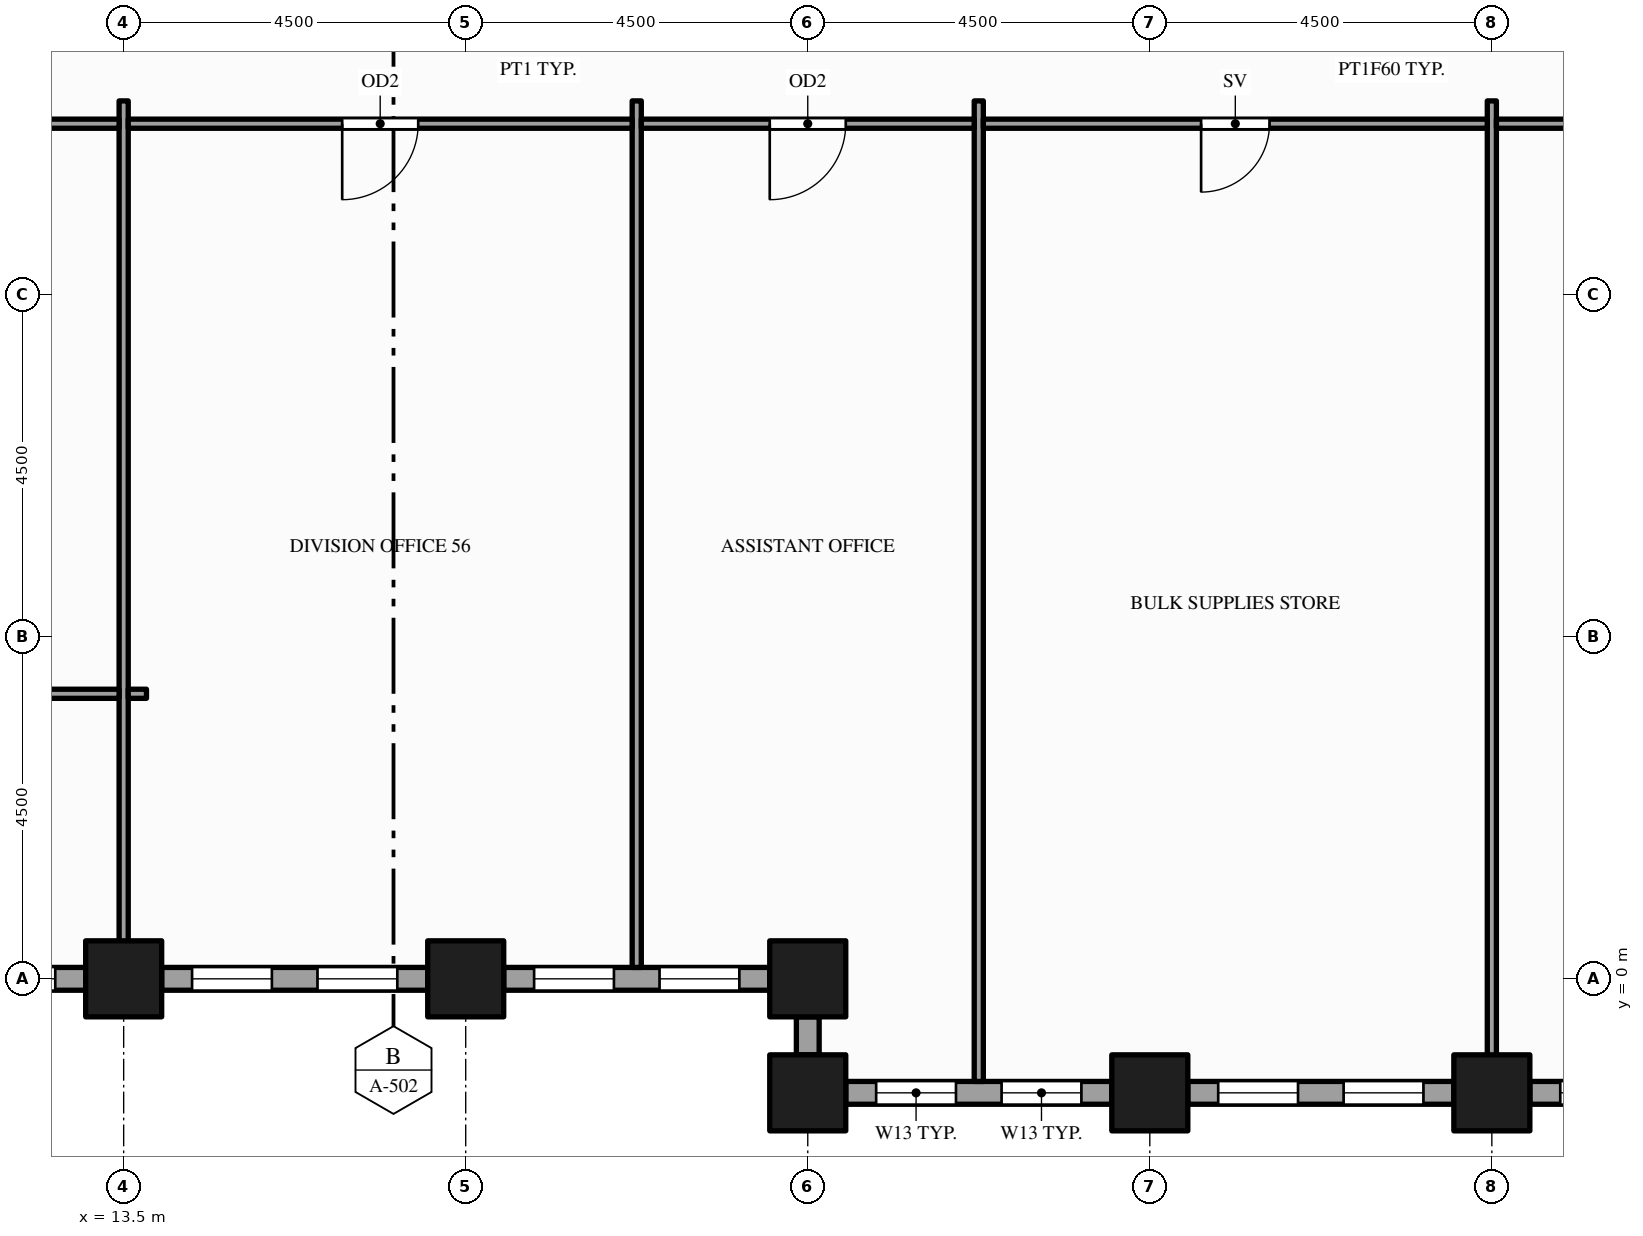
"""IFC4 building model, lengths in metres.
Left out: names, types, materials, properties, quantities, classifications, styles, units other than length and angle.
Written with IfcOpenShell. Run it as: python <this file> out.ifc"""

import sys

from ifc_helpers import new_model, si_unit, direction, frame, frame_2d, origin, origin_2d, place, context, subcontext, project, spatial, rectangle, hollow_rectangle, extrude, element, fill, save


model = new_model("IFC4")
c1 = context("Model", 3, precision=1e-05, world=origin(), true_north=direction((0.0, 1.0)))
c2 = subcontext(c1, "Body", "Model", "MODEL_VIEW")
j1 = project(units=[si_unit("LENGTHUNIT", "METRE"), si_unit("PLANEANGLEUNIT", "RADIAN")], contexts=[c1])
p1 = place(None, origin())
s1 = spatial("IfcSite", under=j1, at=p1, CompositionType="ELEMENT")
p2 = place(p1, origin())
s2 = spatial("IfcBuilding", under=s1, at=p2, CompositionType="ELEMENT")
p3 = place(p2, frame((0.0, 0.0, 123.0)))
s3 = spatial("IfcBuildingStorey", under=s2, at=p3, CompositionType="ELEMENT", Elevation=123.0)
for number, where, z_axis, x_axis in (
    (1, (13.5, 0.0, -0.15), (0.0, 0.0, 1.0), (1.0, 0.0, 0.0)),
    (2, (18.0, 0.0, -0.15), (0.0, 0.0, 1.0), (1.0, 0.0, 0.0)),
    (3, (22.5, -1.5, -0.15), (0.0, 0.0, 1.0), (1.0, 0.0, 0.0)),
    (4, (22.5, 0.0, -0.15), (0.0, 0.0, 1.0), (1.0, 0.0, 0.0)),
    (5, (27.0, -1.5, -0.15), (0.0, 0.0, 1.0), (1.0, 0.0, 0.0)),
    (6, (31.5, -1.5, -0.15), (0.0, 0.0, 1.0), (1.0, 0.0, 0.0)),
):
    element("IfcColumn", number, at=place(p3, frame(where, z_axis=z_axis, x_axis=x_axis)), inside=s3, PredefinedType="COLUMN", context=c2, shape_type="SweptSolid", body=[
        extrude(hollow_rectangle(XDim=1.0, YDim=1.0, WallThickness=0.05, at=origin_2d()), origin(), (0.0, 0.0, 1.0), 4.0),
    ])
p4 = place(p3, frame((23.0, -1.5, 0.0), z_axis=(0.0, 0.0, 1.0), x_axis=(1.0, 0.0, 0.0)))
e7 = element("IfcWall", 7, at=p4, inside=s3, PredefinedType="STANDARD", context=c2, shape_type="SweptSolid", body=[
    extrude(rectangle(XDim=3.5, YDim=0.3, at=frame_2d((1.75, 0.0))), origin(), (0.0, 0.0, 1.0), 3.154),
])
p5 = place(p4, frame((0.4, 0.0, 0.9)))
e8 = element("IfcOpeningElement", 8, at=p5, cuts=e7, PredefinedType="OPENING", context=c2, shape_type="SweptSolid", body=[
    extrude(rectangle(XDim=1.05, YDim=2.0, at=frame_2d((0.525, 1.0))), frame((0.0, 0.16, 0.0), z_axis=(0.0, -1.0, 0.0), x_axis=(1.0, 0.0, 0.0)), (0.0, 0.0, 1.0), 0.32),
])
p6 = place(p4, frame((2.05, 0.0, 0.9)))
e9 = element("IfcOpeningElement", 9, at=p6, cuts=e7, PredefinedType="OPENING", context=c2, shape_type="SweptSolid", body=[
    extrude(rectangle(XDim=1.05, YDim=2.0, at=frame_2d((0.525, 1.0))), frame((0.0, 0.16, 0.0), z_axis=(0.0, -1.0, 0.0), x_axis=(1.0, 0.0, 0.0)), (0.0, 0.0, 1.0), 0.32),
])
p7 = place(p3, frame((27.5, -1.5, 0.0), z_axis=(0.0, 0.0, 1.0), x_axis=(1.0, 0.0, 0.0)))
e10 = element("IfcWall", 10, at=p7, inside=s3, PredefinedType="STANDARD", context=c2, shape_type="SweptSolid", body=[
    extrude(rectangle(XDim=3.5, YDim=0.3, at=frame_2d((1.75, 0.0))), origin(), (0.0, 0.0, 1.0), 3.154),
])
p8 = place(p7, frame((0.4, 0.0, 0.9)))
e11 = element("IfcOpeningElement", 11, at=p8, cuts=e10, PredefinedType="OPENING", context=c2, shape_type="SweptSolid", body=[
    extrude(rectangle(XDim=1.05, YDim=2.0, at=frame_2d((0.525, 1.0))), frame((0.0, 0.16, 0.0), z_axis=(0.0, -1.0, 0.0), x_axis=(1.0, 0.0, 0.0)), (0.0, 0.0, 1.0), 0.32),
])
p9 = place(p7, frame((2.05, 0.0, 0.9)))
e12 = element("IfcOpeningElement", 12, at=p9, cuts=e10, PredefinedType="OPENING", context=c2, shape_type="SweptSolid", body=[
    extrude(rectangle(XDim=1.05, YDim=2.0, at=frame_2d((0.525, 1.0))), frame((0.0, 0.16, 0.0), z_axis=(0.0, -1.0, 0.0), x_axis=(1.0, 0.0, 0.0)), (0.0, 0.0, 1.0), 0.32),
])
p10 = place(p3, frame((32.0, -1.5, 0.0), z_axis=(0.0, 0.0, 1.0), x_axis=(1.0, 0.0, 0.0)))
e13 = element("IfcWall", 13, at=p10, inside=s3, PredefinedType="STANDARD", context=c2, shape_type="SweptSolid", body=[
    extrude(rectangle(XDim=3.5, YDim=0.3, at=frame_2d((1.75, 0.0))), origin(), (0.0, 0.0, 1.0), 3.154),
])
p11 = place(p10, frame((0.4, 0.0, 0.9)))
e14 = element("IfcOpeningElement", 14, at=p11, cuts=e13, PredefinedType="OPENING", context=c2, shape_type="SweptSolid", body=[
    extrude(rectangle(XDim=1.05, YDim=2.0, at=frame_2d((0.525, 1.0))), frame((0.0, 0.16, 0.0), z_axis=(0.0, -1.0, 0.0), x_axis=(1.0, 0.0, 0.0)), (0.0, 0.0, 1.0), 0.32),
])
p12 = place(p10, frame((2.05, 0.0, 0.9)))
e15 = element("IfcOpeningElement", 15, at=p12, cuts=e13, PredefinedType="OPENING", context=c2, shape_type="SweptSolid", body=[
    extrude(rectangle(XDim=1.05, YDim=2.0, at=frame_2d((0.525, 1.0))), frame((0.0, 0.16, 0.0), z_axis=(0.0, -1.0, 0.0), x_axis=(1.0, 0.0, 0.0)), (0.0, 0.0, 1.0), 0.32),
])
p13 = place(p3, frame((9.5, 0.0, 0.0), z_axis=(0.0, 0.0, 1.0), x_axis=(1.0, 0.0, 0.0)))
e16 = element("IfcWall", 16, at=p13, inside=s3, PredefinedType="STANDARD", context=c2, shape_type="SweptSolid", body=[
    extrude(rectangle(XDim=3.5, YDim=0.3, at=frame_2d((1.75, 0.0))), origin(), (0.0, 0.0, 1.0), 3.154),
])
p14 = place(p13, frame((0.4, 0.0, 0.9)))
e17 = element("IfcOpeningElement", 17, at=p14, cuts=e16, PredefinedType="OPENING", context=c2, shape_type="SweptSolid", body=[
    extrude(rectangle(XDim=1.05, YDim=2.0, at=frame_2d((0.525, 1.0))), frame((0.0, 0.16, 0.0), z_axis=(0.0, -1.0, 0.0), x_axis=(1.0, 0.0, 0.0)), (0.0, 0.0, 1.0), 0.32),
])
p15 = place(p13, frame((2.05, 0.0, 0.9)))
e18 = element("IfcOpeningElement", 18, at=p15, cuts=e16, PredefinedType="OPENING", context=c2, shape_type="SweptSolid", body=[
    extrude(rectangle(XDim=1.05, YDim=2.0, at=frame_2d((0.525, 1.0))), frame((0.0, 0.16, 0.0), z_axis=(0.0, -1.0, 0.0), x_axis=(1.0, 0.0, 0.0)), (0.0, 0.0, 1.0), 0.32),
])
p16 = place(p3, frame((14.0, 0.0, 0.0), z_axis=(0.0, 0.0, 1.0), x_axis=(1.0, 0.0, 0.0)))
e19 = element("IfcWall", 19, at=p16, inside=s3, PredefinedType="STANDARD", context=c2, shape_type="SweptSolid", body=[
    extrude(rectangle(XDim=3.5, YDim=0.3, at=frame_2d((1.75, 0.0))), origin(), (0.0, 0.0, 1.0), 3.154),
])
p17 = place(p16, frame((0.4, 0.0, 0.9)))
e20 = element("IfcOpeningElement", 20, at=p17, cuts=e19, PredefinedType="OPENING", context=c2, shape_type="SweptSolid", body=[
    extrude(rectangle(XDim=1.05, YDim=2.0, at=frame_2d((0.525, 1.0))), frame((0.0, 0.16, 0.0), z_axis=(0.0, -1.0, 0.0), x_axis=(1.0, 0.0, 0.0)), (0.0, 0.0, 1.0), 0.32),
])
p18 = place(p16, frame((2.05, 0.0, 0.9)))
e21 = element("IfcOpeningElement", 21, at=p18, cuts=e19, PredefinedType="OPENING", context=c2, shape_type="SweptSolid", body=[
    extrude(rectangle(XDim=1.05, YDim=2.0, at=frame_2d((0.525, 1.0))), frame((0.0, 0.16, 0.0), z_axis=(0.0, -1.0, 0.0), x_axis=(1.0, 0.0, 0.0)), (0.0, 0.0, 1.0), 0.32),
])
p19 = place(p3, frame((18.5, 0.0, 0.0), z_axis=(0.0, 0.0, 1.0), x_axis=(1.0, 0.0, 0.0)))
e22 = element("IfcWall", 22, at=p19, inside=s3, PredefinedType="STANDARD", context=c2, shape_type="SweptSolid", body=[
    extrude(rectangle(XDim=3.5, YDim=0.3, at=frame_2d((1.75, 0.0))), origin(), (0.0, 0.0, 1.0), 3.154),
])
p20 = place(p19, frame((0.4, 0.0, 0.9)))
e23 = element("IfcOpeningElement", 23, at=p20, cuts=e22, PredefinedType="OPENING", context=c2, shape_type="SweptSolid", body=[
    extrude(rectangle(XDim=1.05, YDim=2.0, at=frame_2d((0.525, 1.0))), frame((0.0, 0.16, 0.0), z_axis=(0.0, -1.0, 0.0), x_axis=(1.0, 0.0, 0.0)), (0.0, 0.0, 1.0), 0.32),
])
p21 = place(p19, frame((2.05, 0.0, 0.9)))
e24 = element("IfcOpeningElement", 24, at=p21, cuts=e22, PredefinedType="OPENING", context=c2, shape_type="SweptSolid", body=[
    extrude(rectangle(XDim=1.05, YDim=2.0, at=frame_2d((0.525, 1.0))), frame((0.0, 0.16, 0.0), z_axis=(0.0, -1.0, 0.0), x_axis=(1.0, 0.0, 0.0)), (0.0, 0.0, 1.0), 0.32),
])
p22 = place(p3, frame((22.5, -0.5, 0.0), z_axis=(0.0, 0.0, 1.0), x_axis=(0.0, -1.0, 0.0)))
e25 = element("IfcWall", 25, at=p22, inside=s3, PredefinedType="STANDARD", context=c2, shape_type="SweptSolid", body=[
    extrude(rectangle(XDim=0.5, YDim=0.3, at=frame_2d((0.25, 0.0))), origin(), (0.0, 0.0, 1.0), 3.154),
])
for number, where, z_axis, x_axis in (
    (26, (13.5, 0.15, 0.0), (0.0, 0.0, 1.0), (0.0, 1.0, 0.0)),
    (27, (20.25, 0.15, 0.0), (0.0, 0.0, 1.0), (0.0, 1.0, 0.0)),
):
    element("IfcWall", number, at=place(p3, frame(where, z_axis=z_axis, x_axis=x_axis)), inside=s3, PredefinedType="PARTITIONING", context=c2, shape_type="SweptSolid", body=[
        extrude(rectangle(XDim=11.4, YDim=0.12, at=frame_2d((5.7, 0.0))), origin(), (0.0, 0.0, 1.0), 2.938),
    ])
p23 = place(p3, frame((24.75, -1.35, 0.0), z_axis=(0.0, 0.0, 1.0), x_axis=(0.0, 1.0, 0.0)))
e28 = element("IfcWall", 28, at=p23, inside=s3, PredefinedType="PARTITIONING", context=c2, shape_type="SweptSolid", body=[
    extrude(rectangle(XDim=12.9, YDim=0.12, at=frame_2d((6.45, 0.0))), origin(), (0.0, 0.0, 1.0), 2.76),
])
p24 = place(p3, frame((31.5, -1.35, 0.0), z_axis=(0.0, 0.0, 1.0), x_axis=(0.0, 1.0, 0.0)))
e29 = element("IfcWall", 29, at=p24, inside=s3, PredefinedType="PARTITIONING", context=c2, shape_type="SweptSolid", body=[
    extrude(rectangle(XDim=12.9, YDim=0.12, at=frame_2d((6.45, 0.0))), origin(), (0.0, 0.0, 1.0), 2.938),
])
p25 = place(p3, frame((9.125, 3.75, 0.0), z_axis=(0.0, 0.0, 1.0), x_axis=(1.0, 0.0, 0.0)))
e30 = element("IfcWall", 30, at=p25, inside=s3, PredefinedType="PARTITIONING", context=c2, shape_type="SweptSolid", body=[
    extrude(rectangle(XDim=4.315, YDim=0.12, at=frame_2d((2.157, 0.0))), origin(), (0.0, 0.0, 1.0), 2.938),
])
p26 = place(p3, frame((13.56, 3.75, 0.0), z_axis=(0.0, 0.0, 1.0), x_axis=(1.0, 0.0, 0.0)))
e31 = element("IfcWall", 31, at=p26, inside=s3, PredefinedType="PARTITIONING", context=c2, shape_type="SweptSolid", body=[
    extrude(rectangle(XDim=0.24, YDim=0.12, at=frame_2d((0.12, 0.0))), origin(), (0.0, 0.0, 1.0), 2.938),
])
p27 = place(p3, frame((0.15, 11.25, 0.0), z_axis=(0.0, 0.0, 1.0), x_axis=(1.0, 0.0, 0.0)))
e32 = element("IfcWall", 32, at=p27, inside=s3, PredefinedType="PARTITIONING", context=c2, shape_type="SweptSolid", body=[
    extrude(rectangle(XDim=13.29, YDim=0.12, at=frame_2d((6.645, 0.0))), origin(), (0.0, 0.0, 1.0), 2.938),
])
p28 = place(p27, frame((6.055, 0.0, 0.0)))
e33 = element("IfcOpeningElement", 33, at=p28, cuts=e32, PredefinedType="OPENING", context=c2, shape_type="SweptSolid", body=[
    extrude(rectangle(XDim=1.2, YDim=2.1, at=frame_2d((0.6, 1.05))), frame((0.0, 0.07, 0.0), z_axis=(0.0, -1.0, 0.0), x_axis=(1.0, 0.0, 0.0)), (0.0, 0.0, 1.0), 0.14),
])
p29 = place(p3, frame((13.56, 11.25, 0.0), z_axis=(0.0, 0.0, 1.0), x_axis=(1.0, 0.0, 0.0)))
e34 = element("IfcWall", 34, at=p29, inside=s3, PredefinedType="PARTITIONING", context=c2, shape_type="SweptSolid", body=[
    extrude(rectangle(XDim=6.63, YDim=0.12, at=frame_2d((3.315, 0.0))), origin(), (0.0, 0.0, 1.0), 2.938),
])
p30 = place(p29, frame((2.815, 0.0, 0.0)))
e35 = element("IfcOpeningElement", 35, at=p30, cuts=e34, PredefinedType="OPENING", context=c2, shape_type="SweptSolid", body=[
    extrude(rectangle(XDim=1.0, YDim=2.1, at=frame_2d((0.5, 1.05))), frame((0.0, 0.07, 0.0), z_axis=(0.0, -1.0, 0.0), x_axis=(1.0, 0.0, 0.0)), (0.0, 0.0, 1.0), 0.14),
])
p31 = place(p3, frame((20.31, 11.25, 0.0), z_axis=(0.0, 0.0, 1.0), x_axis=(1.0, 0.0, 0.0)))
e36 = element("IfcWall", 36, at=p31, inside=s3, PredefinedType="PARTITIONING", context=c2, shape_type="SweptSolid", body=[
    extrude(rectangle(XDim=4.38, YDim=0.12, at=frame_2d((2.19, 0.0))), origin(), (0.0, 0.0, 1.0), 2.76),
])
p32 = place(p31, frame((1.69, 0.0, 0.0)))
e37 = element("IfcOpeningElement", 37, at=p32, cuts=e36, PredefinedType="OPENING", context=c2, shape_type="SweptSolid", body=[
    extrude(rectangle(XDim=1.0, YDim=2.1, at=frame_2d((0.5, 1.05))), frame((0.0, 0.07, 0.0), z_axis=(0.0, -1.0, 0.0), x_axis=(1.0, 0.0, 0.0)), (0.0, 0.0, 1.0), 0.14),
])
p33 = place(p3, frame((24.81, 11.25, 0.0), z_axis=(0.0, 0.0, 1.0), x_axis=(1.0, 0.0, 0.0)))
e38 = element("IfcWall", 38, at=p33, inside=s3, PredefinedType="PARTITIONING", context=c2, shape_type="SweptSolid", body=[
    extrude(rectangle(XDim=6.63, YDim=0.12, at=frame_2d((3.315, 0.0))), origin(), (0.0, 0.0, 1.0), 2.76),
])
p34 = place(p33, frame((2.865, 0.0, 0.0)))
e39 = element("IfcOpeningElement", 39, at=p34, cuts=e38, PredefinedType="OPENING", context=c2, shape_type="SweptSolid", body=[
    extrude(rectangle(XDim=0.9, YDim=2.1, at=frame_2d((0.45, 1.05))), frame((0.0, 0.07, 0.0), z_axis=(0.0, -1.0, 0.0), x_axis=(1.0, 0.0, 0.0)), (0.0, 0.0, 1.0), 0.14),
])
p35 = place(p3, frame((31.56, 11.25, 0.0), z_axis=(0.0, 0.0, 1.0), x_axis=(1.0, 0.0, 0.0)))
e40 = element("IfcWall", 40, at=p35, inside=s3, PredefinedType="PARTITIONING", context=c2, shape_type="SweptSolid", body=[
    extrude(rectangle(XDim=6.63, YDim=0.12, at=frame_2d((3.315, 0.0))), origin(), (0.0, 0.0, 1.0), 2.938),
])
p36 = place(p35, frame((2.865, 0.0, 0.0)))
e41 = element("IfcOpeningElement", 41, at=p36, cuts=e40, PredefinedType="OPENING", context=c2, shape_type="SweptSolid", body=[
    extrude(rectangle(XDim=0.9, YDim=2.1, at=frame_2d((0.45, 1.05))), frame((0.0, 0.07, 0.0), z_axis=(0.0, -1.0, 0.0), x_axis=(1.0, 0.0, 0.0)), (0.0, 0.0, 1.0), 0.14),
])
p37 = place(p5, origin())
e42 = element("IfcWindow", 42, at=p37, inside=s3, PartitioningType="SINGLE_PANEL", PredefinedType="WINDOW", context=c2, shape_type="SweptSolid", body=[
    extrude(rectangle(XDim=1.05, YDim=2.0, at=frame_2d((0.525, 1.0))), frame((0.0, 0.03, 0.0), z_axis=(0.0, -1.0, 0.0), x_axis=(1.0, 0.0, 0.0)), (0.0, 0.0, 1.0), 0.06),
])
fill(e8, e42)
p38 = place(p6, origin())
e43 = element("IfcWindow", 43, at=p38, inside=s3, PartitioningType="SINGLE_PANEL", PredefinedType="WINDOW", context=c2, shape_type="SweptSolid", body=[
    extrude(rectangle(XDim=1.05, YDim=2.0, at=frame_2d((0.525, 1.0))), frame((0.0, 0.03, 0.0), z_axis=(0.0, -1.0, 0.0), x_axis=(1.0, 0.0, 0.0)), (0.0, 0.0, 1.0), 0.06),
])
fill(e9, e43)
p39 = place(p8, origin())
e44 = element("IfcWindow", 44, at=p39, inside=s3, PartitioningType="SINGLE_PANEL", PredefinedType="WINDOW", context=c2, shape_type="SweptSolid", body=[
    extrude(rectangle(XDim=1.05, YDim=2.0, at=frame_2d((0.525, 1.0))), frame((0.0, 0.03, 0.0), z_axis=(0.0, -1.0, 0.0), x_axis=(1.0, 0.0, 0.0)), (0.0, 0.0, 1.0), 0.06),
])
fill(e11, e44)
p40 = place(p9, origin())
e45 = element("IfcWindow", 45, at=p40, inside=s3, PartitioningType="SINGLE_PANEL", PredefinedType="WINDOW", context=c2, shape_type="SweptSolid", body=[
    extrude(rectangle(XDim=1.05, YDim=2.0, at=frame_2d((0.525, 1.0))), frame((0.0, 0.03, 0.0), z_axis=(0.0, -1.0, 0.0), x_axis=(1.0, 0.0, 0.0)), (0.0, 0.0, 1.0), 0.06),
])
fill(e12, e45)
p41 = place(p11, origin())
e46 = element("IfcWindow", 46, at=p41, inside=s3, PartitioningType="SINGLE_PANEL", PredefinedType="WINDOW", context=c2, shape_type="SweptSolid", body=[
    extrude(rectangle(XDim=1.05, YDim=2.0, at=frame_2d((0.525, 1.0))), frame((0.0, 0.03, 0.0), z_axis=(0.0, -1.0, 0.0), x_axis=(1.0, 0.0, 0.0)), (0.0, 0.0, 1.0), 0.06),
])
fill(e14, e46)
p42 = place(p15, origin())
e47 = element("IfcWindow", 47, at=p42, inside=s3, PartitioningType="SINGLE_PANEL", PredefinedType="WINDOW", context=c2, shape_type="SweptSolid", body=[
    extrude(rectangle(XDim=1.05, YDim=2.0, at=frame_2d((0.525, 1.0))), frame((0.0, 0.03, 0.0), z_axis=(0.0, -1.0, 0.0), x_axis=(1.0, 0.0, 0.0)), (0.0, 0.0, 1.0), 0.06),
])
fill(e18, e47)
p43 = place(p17, origin())
e48 = element("IfcWindow", 48, at=p43, inside=s3, PartitioningType="SINGLE_PANEL", PredefinedType="WINDOW", context=c2, shape_type="SweptSolid", body=[
    extrude(rectangle(XDim=1.05, YDim=2.0, at=frame_2d((0.525, 1.0))), frame((0.0, 0.03, 0.0), z_axis=(0.0, -1.0, 0.0), x_axis=(1.0, 0.0, 0.0)), (0.0, 0.0, 1.0), 0.06),
])
fill(e20, e48)
p44 = place(p18, origin())
e49 = element("IfcWindow", 49, at=p44, inside=s3, PartitioningType="SINGLE_PANEL", PredefinedType="WINDOW", context=c2, shape_type="SweptSolid", body=[
    extrude(rectangle(XDim=1.05, YDim=2.0, at=frame_2d((0.525, 1.0))), frame((0.0, 0.03, 0.0), z_axis=(0.0, -1.0, 0.0), x_axis=(1.0, 0.0, 0.0)), (0.0, 0.0, 1.0), 0.06),
])
fill(e21, e49)
p45 = place(p20, origin())
e50 = element("IfcWindow", 50, at=p45, inside=s3, PartitioningType="SINGLE_PANEL", PredefinedType="WINDOW", context=c2, shape_type="SweptSolid", body=[
    extrude(rectangle(XDim=1.05, YDim=2.0, at=frame_2d((0.525, 1.0))), frame((0.0, 0.03, 0.0), z_axis=(0.0, -1.0, 0.0), x_axis=(1.0, 0.0, 0.0)), (0.0, 0.0, 1.0), 0.06),
])
fill(e23, e50)
p46 = place(p21, origin())
e51 = element("IfcWindow", 51, at=p46, inside=s3, PartitioningType="SINGLE_PANEL", PredefinedType="WINDOW", context=c2, shape_type="SweptSolid", body=[
    extrude(rectangle(XDim=1.05, YDim=2.0, at=frame_2d((0.525, 1.0))), frame((0.0, 0.03, 0.0), z_axis=(0.0, -1.0, 0.0), x_axis=(1.0, 0.0, 0.0)), (0.0, 0.0, 1.0), 0.06),
])
fill(e24, e51)
p47 = place(p30, origin())
e52 = element("IfcDoor", 52, at=p47, inside=s3, OperationType="SINGLE_SWING_LEFT", PredefinedType="DOOR", context=c2, shape_type="SweptSolid", body=[
    extrude(rectangle(XDim=1.0, YDim=2.1, at=frame_2d((0.5, 1.05))), frame((0.0, 0.025, 0.0), z_axis=(0.0, -1.0, 0.0), x_axis=(1.0, 0.0, 0.0)), (0.0, 0.0, 1.0), 0.05),
])
fill(e35, e52)
p48 = place(p32, origin())
e53 = element("IfcDoor", 53, at=p48, inside=s3, OperationType="SINGLE_SWING_LEFT", PredefinedType="DOOR", context=c2, shape_type="SweptSolid", body=[
    extrude(rectangle(XDim=1.0, YDim=2.1, at=frame_2d((0.5, 1.05))), frame((0.0, 0.025, 0.0), z_axis=(0.0, -1.0, 0.0), x_axis=(1.0, 0.0, 0.0)), (0.0, 0.0, 1.0), 0.05),
])
fill(e37, e53)
p49 = place(p34, origin())
e54 = element("IfcDoor", 54, at=p49, inside=s3, OperationType="SINGLE_SWING_LEFT", PredefinedType="DOOR", context=c2, shape_type="SweptSolid", body=[
    extrude(rectangle(XDim=0.9, YDim=2.1, at=frame_2d((0.45, 1.05))), frame((0.0, 0.025, 0.0), z_axis=(0.0, -1.0, 0.0), x_axis=(1.0, 0.0, 0.0)), (0.0, 0.0, 1.0), 0.05),
])
fill(e39, e54)
save(model, sys.argv[1])
